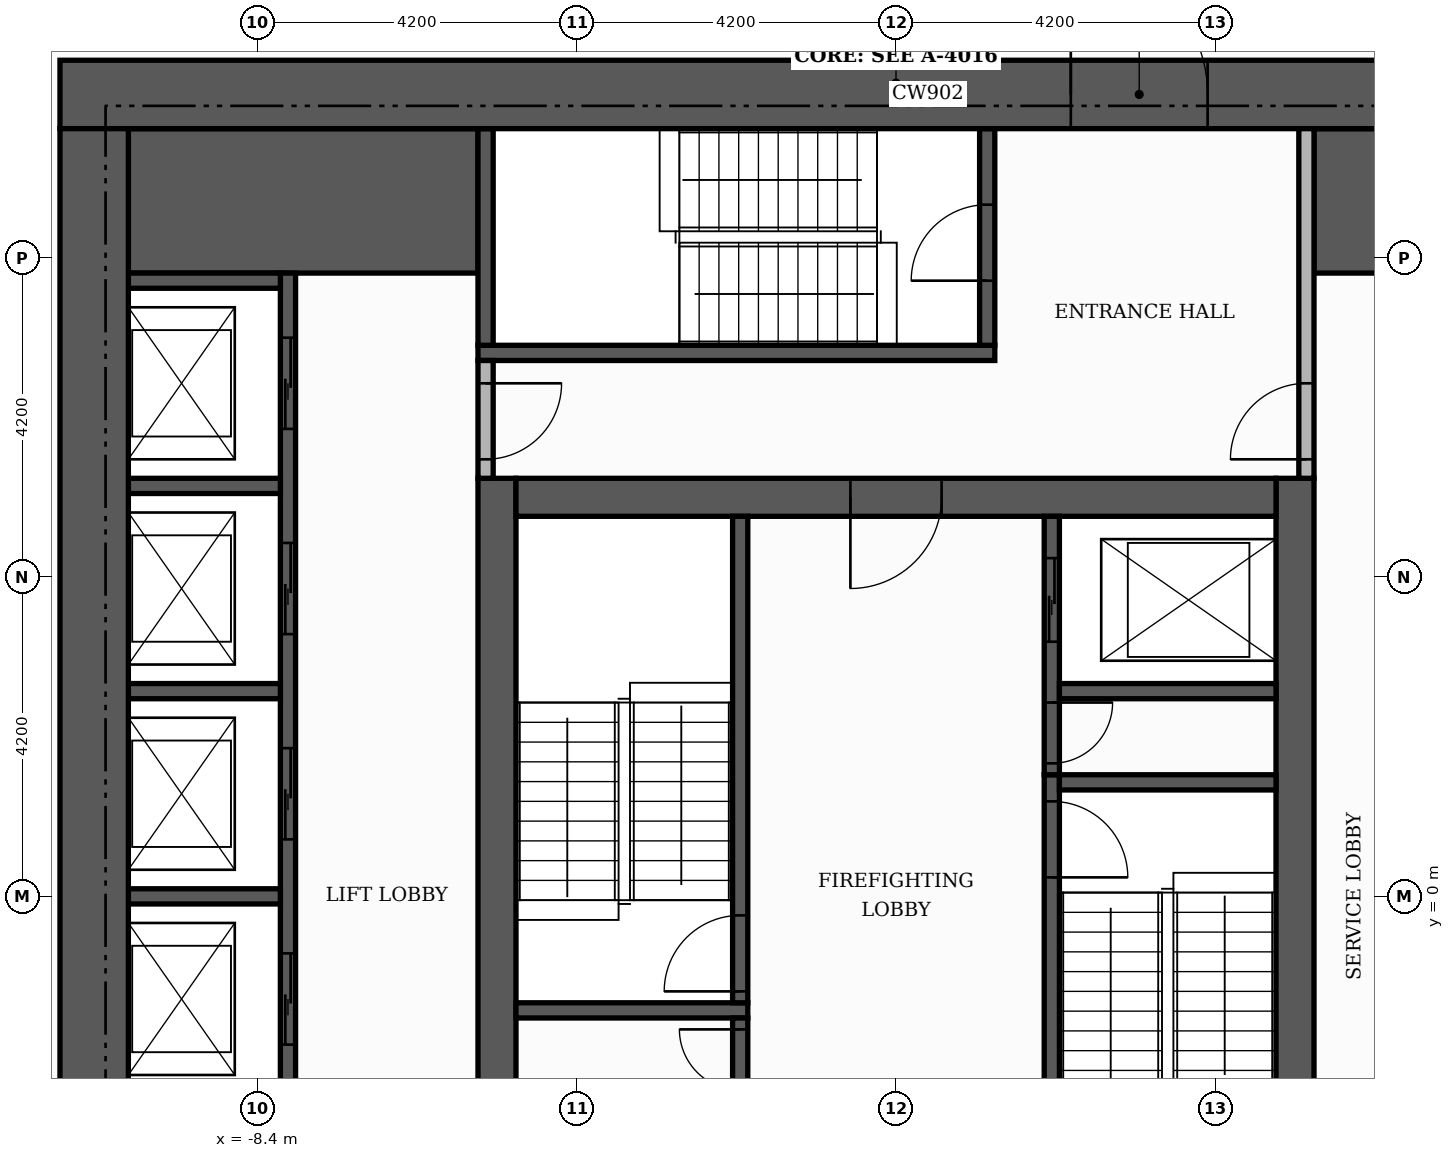
"""IFC4 building model, lengths in metres.
Left out: names, types, materials, properties, quantities, classifications, styles, units other than length and angle.
Written with IfcOpenShell. Run it as: python <this file> out.ifc"""

import sys

from ifc_helpers import new_model, si_unit, direction, frame, frame_2d, origin, place, context, subcontext, project, spatial, rectangle, extrude, element, fill, save


model = new_model("IFC4")
c1 = context("Model", 3, precision=1e-05, world=origin(), true_north=direction((0.0, 1.0)))
c2 = subcontext(c1, "Body", "Model", "MODEL_VIEW")
j1 = project(units=[si_unit("LENGTHUNIT", "METRE"), si_unit("PLANEANGLEUNIT", "RADIAN")], contexts=[c1])
p1 = place(None, origin())
s1 = spatial("IfcSite", under=j1, at=p1, CompositionType="ELEMENT")
p2 = place(p1, origin())
s2 = spatial("IfcBuilding", under=s1, at=p2, CompositionType="ELEMENT")
p3 = place(p2, frame((0.0, 0.0, 106.5)))
s3 = spatial("IfcBuildingStorey", under=s2, at=p3, CompositionType="ELEMENT", Elevation=106.5)
for number, where, z_axis, x_axis in (
    (1, (-5.25, -5.0, 0.0), (0.0, 0.0, 1.0), (0.0, 1.0, 0.0)),
    (2, (5.25, -5.0, 0.0), (0.0, 0.0, 1.0), (0.0, 1.0, 0.0)),
):
    element("IfcWall", number, at=place(p3, frame(where, z_axis=z_axis, x_axis=x_axis)), inside=s3, PredefinedType="SHEAR", context=c2, shape_type="SweptSolid", body=[
        extrude(rectangle(XDim=10.5, YDim=0.5, at=frame_2d((5.25, 0.0))), origin(), (0.0, 0.0, 1.0), 3.48),
    ])
p4 = place(p3, frame((-5.0, 5.25, 0.0), z_axis=(0.0, 0.0, 1.0), x_axis=(1.0, 0.0, 0.0)))
e3 = element("IfcWall", 3, at=p4, inside=s3, PredefinedType="SHEAR", context=c2, shape_type="SweptSolid", body=[
    extrude(rectangle(XDim=10.0, YDim=0.5, at=frame_2d((5.0, 0.0))), origin(), (0.0, 0.0, 1.0), 3.48),
])
p5 = place(p4, frame((4.4, 0.0, 0.0)))
e4 = element("IfcOpeningElement", 4, at=p5, cuts=e3, PredefinedType="OPENING", context=c2, shape_type="SweptSolid", body=[
    extrude(rectangle(XDim=1.2, YDim=2.1, at=frame_2d((0.6, 1.05))), frame((0.0, 0.26, 0.0), z_axis=(0.0, -1.0, 0.0), x_axis=(1.0, 0.0, 0.0)), (0.0, 0.0, 1.0), 0.52),
])
for number, where, z_axis, x_axis in (
    (5, (-10.1, 9.15, 0.0), (0.0, 0.0, 1.0), (1.0, 0.0, 0.0)),
    (6, (5.5, 9.15, 0.0), (0.0, 0.0, 1.0), (1.0, 0.0, 0.0)),
):
    element("IfcWall", number, at=place(p3, frame(where, z_axis=z_axis, x_axis=x_axis)), inside=s3, PredefinedType="SHEAR", context=c2, shape_type="SweptSolid", body=[
        extrude(rectangle(XDim=4.6, YDim=1.9, at=frame_2d((2.3, 0.0))), origin(), (0.0, 0.0, 1.0), 3.48),
    ])
p6 = place(p3, frame((2.05, -5.0, 0.0), z_axis=(0.0, 0.0, 1.0), x_axis=(0.0, 1.0, 0.0)))
e7 = element("IfcWall", 7, at=p6, inside=s3, PredefinedType="SHEAR", context=c2, shape_type="SweptSolid", body=[
    extrude(rectangle(XDim=6.6, YDim=0.2, at=frame_2d((3.3, 0.0))), origin(), (0.0, 0.0, 1.0), 3.48),
])
p7 = place(p6, frame((5.25, 0.0, 0.0)))
e8 = element("IfcOpeningElement", 8, at=p7, cuts=e7, PredefinedType="OPENING", context=c2, shape_type="SweptSolid", body=[
    extrude(rectangle(XDim=1.0, YDim=2.1, at=frame_2d((0.5, 1.05))), frame((0.0, 0.11, 0.0), z_axis=(0.0, -1.0, 0.0), x_axis=(1.0, 0.0, 0.0)), (0.0, 0.0, 1.0), 0.22),
])
p8 = place(p3, frame((-5.0, -1.5, 0.0), z_axis=(0.0, 0.0, 1.0), x_axis=(1.0, 0.0, 0.0)))
e9 = element("IfcWall", 9, at=p8, inside=s3, PredefinedType="SHEAR", context=c2, shape_type="SweptSolid", body=[
    extrude(rectangle(XDim=3.05, YDim=0.2, at=frame_2d((1.525, 0.0))), origin(), (0.0, 0.0, 1.0), 3.48),
])
p9 = place(p3, frame((-2.05, -1.4, 0.0), z_axis=(0.0, 0.0, 1.0), x_axis=(0.0, 1.0, 0.0)))
e10 = element("IfcWall", 10, at=p9, inside=s3, PredefinedType="SHEAR", context=c2, shape_type="SweptSolid", body=[
    extrude(rectangle(XDim=6.4, YDim=0.2, at=frame_2d((3.2, 0.0))), origin(), (0.0, 0.0, 1.0), 3.48),
])
p10 = place(p9, frame((0.15, 0.0, 0.0)))
e11 = element("IfcOpeningElement", 11, at=p10, cuts=e10, PredefinedType="OPENING", context=c2, shape_type="SweptSolid", body=[
    extrude(rectangle(XDim=1.0, YDim=2.1, at=frame_2d((0.5, 1.05))), frame((0.0, 0.11, 0.0), z_axis=(0.0, -1.0, 0.0), x_axis=(1.0, 0.0, 0.0)), (0.0, 0.0, 1.0), 0.22),
])
p11 = place(p3, frame((2.15, 1.5, 0.0), z_axis=(0.0, 0.0, 1.0), x_axis=(1.0, 0.0, 0.0)))
e12 = element("IfcWall", 12, at=p11, inside=s3, PredefinedType="SHEAR", context=c2, shape_type="SweptSolid", body=[
    extrude(rectangle(XDim=2.85, YDim=0.2, at=frame_2d((1.425, 0.0))), origin(), (0.0, 0.0, 1.0), 3.48),
])
p12 = place(p3, frame((-5.5, 7.15, 0.0), z_axis=(0.0, 0.0, 1.0), x_axis=(1.0, 0.0, 0.0)))
e13 = element("IfcWall", 13, at=p12, inside=s3, PredefinedType="SHEAR", context=c2, shape_type="SweptSolid", body=[
    extrude(rectangle(XDim=6.8, YDim=0.2, at=frame_2d((3.4, 0.0))), origin(), (0.0, 0.0, 1.0), 3.48),
])
p13 = place(p3, frame((-5.4, 7.25, 0.0), z_axis=(0.0, 0.0, 1.0), x_axis=(0.0, 1.0, 0.0)))
e14 = element("IfcWall", 14, at=p13, inside=s3, PredefinedType="SHEAR", context=c2, shape_type="SweptSolid", body=[
    extrude(rectangle(XDim=2.85, YDim=0.2, at=frame_2d((1.425, 0.0))), origin(), (0.0, 0.0, 1.0), 3.48),
])
p14 = place(p3, frame((1.2, 7.25, 0.0), z_axis=(0.0, 0.0, 1.0), x_axis=(0.0, 1.0, 0.0)))
e15 = element("IfcWall", 15, at=p14, inside=s3, PredefinedType="SHEAR", context=c2, shape_type="SweptSolid", body=[
    extrude(rectangle(XDim=2.85, YDim=0.2, at=frame_2d((1.425, 0.0))), origin(), (0.0, 0.0, 1.0), 3.48),
])
p15 = place(p14, frame((0.85, 0.0, 0.0)))
e16 = element("IfcOpeningElement", 16, at=p15, cuts=e15, PredefinedType="OPENING", context=c2, shape_type="SweptSolid", body=[
    extrude(rectangle(XDim=1.0, YDim=2.1, at=frame_2d((0.5, 1.05))), frame((0.0, 0.11, 0.0), z_axis=(0.0, -1.0, 0.0), x_axis=(1.0, 0.0, 0.0)), (0.0, 0.0, 1.0), 0.22),
])
p16 = place(p3, frame((-8.0, -8.0, 0.0), z_axis=(0.0, 0.0, 1.0), x_axis=(0.0, 1.0, 0.0)))
e17 = element("IfcWall", 17, at=p16, inside=s3, PredefinedType="SHEAR", context=c2, shape_type="SweptSolid", body=[
    extrude(rectangle(XDim=16.2, YDim=0.2, at=frame_2d((8.1, 0.0))), origin(), (0.0, 0.0, 1.0), 3.48),
])
p17 = place(p16, frame((0.65, 0.0, 0.0)))
e18 = element("IfcOpeningElement", 18, at=p17, cuts=e17, PredefinedType="OPENING", context=c2, shape_type="SweptSolid", body=[
    extrude(rectangle(XDim=1.2, YDim=2.1, at=frame_2d((0.6, 1.05))), frame((0.0, 0.11, 0.0), z_axis=(0.0, -1.0, 0.0), x_axis=(1.0, 0.0, 0.0)), (0.0, 0.0, 1.0), 0.22),
])
p18 = place(p16, frame((3.35, 0.0, 0.0)))
e19 = element("IfcOpeningElement", 19, at=p18, cuts=e17, PredefinedType="OPENING", context=c2, shape_type="SweptSolid", body=[
    extrude(rectangle(XDim=1.2, YDim=2.1, at=frame_2d((0.6, 1.05))), frame((0.0, 0.11, 0.0), z_axis=(0.0, -1.0, 0.0), x_axis=(1.0, 0.0, 0.0)), (0.0, 0.0, 1.0), 0.22),
])
p19 = place(p16, frame((6.05, 0.0, 0.0)))
e20 = element("IfcOpeningElement", 20, at=p19, cuts=e17, PredefinedType="OPENING", context=c2, shape_type="SweptSolid", body=[
    extrude(rectangle(XDim=1.2, YDim=2.1, at=frame_2d((0.6, 1.05))), frame((0.0, 0.11, 0.0), z_axis=(0.0, -1.0, 0.0), x_axis=(1.0, 0.0, 0.0)), (0.0, 0.0, 1.0), 0.22),
])
p20 = place(p16, frame((8.75, 0.0, 0.0)))
e21 = element("IfcOpeningElement", 21, at=p20, cuts=e17, PredefinedType="OPENING", context=c2, shape_type="SweptSolid", body=[
    extrude(rectangle(XDim=1.2, YDim=2.1, at=frame_2d((0.6, 1.05))), frame((0.0, 0.11, 0.0), z_axis=(0.0, -1.0, 0.0), x_axis=(1.0, 0.0, 0.0)), (0.0, 0.0, 1.0), 0.22),
])
p21 = place(p16, frame((11.45, 0.0, 0.0)))
e22 = element("IfcOpeningElement", 22, at=p21, cuts=e17, PredefinedType="OPENING", context=c2, shape_type="SweptSolid", body=[
    extrude(rectangle(XDim=1.2, YDim=2.1, at=frame_2d((0.6, 1.05))), frame((0.0, 0.11, 0.0), z_axis=(0.0, -1.0, 0.0), x_axis=(1.0, 0.0, 0.0)), (0.0, 0.0, 1.0), 0.22),
])
p22 = place(p16, frame((14.15, 0.0, 0.0)))
e23 = element("IfcOpeningElement", 23, at=p22, cuts=e17, PredefinedType="OPENING", context=c2, shape_type="SweptSolid", body=[
    extrude(rectangle(XDim=1.2, YDim=2.1, at=frame_2d((0.6, 1.05))), frame((0.0, 0.11, 0.0), z_axis=(0.0, -1.0, 0.0), x_axis=(1.0, 0.0, 0.0)), (0.0, 0.0, 1.0), 0.22),
])
p23 = place(p3, frame((-2.05, -5.0, 0.0), z_axis=(0.0, 0.0, 1.0), x_axis=(0.0, 1.0, 0.0)))
e24 = element("IfcWall", 24, at=p23, inside=s3, PredefinedType="SHEAR", context=c2, shape_type="SweptSolid", body=[
    extrude(rectangle(XDim=3.4, YDim=0.2, at=frame_2d((1.7, 0.0))), origin(), (0.0, 0.0, 1.0), 3.48),
])
p24 = place(p23, frame((0.55, 0.0, 0.0)))
e25 = element("IfcOpeningElement", 25, at=p24, cuts=e24, PredefinedType="OPENING", context=c2, shape_type="SweptSolid", body=[
    extrude(rectangle(XDim=1.1, YDim=2.1, at=frame_2d((0.55, 1.05))), frame((0.0, 0.11, 0.0), z_axis=(0.0, -1.0, 0.0), x_axis=(1.0, 0.0, 0.0)), (0.0, 0.0, 1.0), 0.22),
])
p25 = place(p23, frame((2.45, 0.0, 0.0)))
e26 = element("IfcOpeningElement", 26, at=p25, cuts=e24, PredefinedType="OPENING", context=c2, shape_type="SweptSolid", body=[
    extrude(rectangle(XDim=0.8, YDim=2.1, at=frame_2d((0.4, 1.05))), frame((0.0, 0.11, 0.0), z_axis=(0.0, -1.0, 0.0), x_axis=(1.0, 0.0, 0.0)), (0.0, 0.0, 1.0), 0.22),
])
p26 = place(p3, frame((-10.1, 0.0, 0.0), z_axis=(0.0, 0.0, 1.0), x_axis=(1.0, 0.0, 0.0)))
e27 = element("IfcWall", 27, at=p26, inside=s3, PredefinedType="SHEAR", context=c2, shape_type="SweptSolid", body=[
    extrude(rectangle(XDim=2.0, YDim=0.2, at=frame_2d((1.0, 0.0))), origin(), (0.0, 0.0, 1.0), 3.48),
])
p27 = place(p3, frame((2.05, 1.6, 0.0), z_axis=(0.0, 0.0, 1.0), x_axis=(0.0, 1.0, 0.0)))
e28 = element("IfcWall", 28, at=p27, inside=s3, PredefinedType="SHEAR", context=c2, shape_type="SweptSolid", body=[
    extrude(rectangle(XDim=3.4, YDim=0.2, at=frame_2d((1.7, 0.0))), origin(), (0.0, 0.0, 1.0), 3.48),
])
p28 = place(p27, frame((1.75, 0.0, 0.0)))
e29 = element("IfcOpeningElement", 29, at=p28, cuts=e28, PredefinedType="OPENING", context=c2, shape_type="SweptSolid", body=[
    extrude(rectangle(XDim=1.1, YDim=2.1, at=frame_2d((0.55, 1.05))), frame((0.0, 0.11, 0.0), z_axis=(0.0, -1.0, 0.0), x_axis=(1.0, 0.0, 0.0)), (0.0, 0.0, 1.0), 0.22),
])
p29 = place(p27, frame((0.15, 0.0, 0.0)))
e30 = element("IfcOpeningElement", 30, at=p29, cuts=e28, PredefinedType="OPENING", context=c2, shape_type="SweptSolid", body=[
    extrude(rectangle(XDim=0.8, YDim=2.1, at=frame_2d((0.4, 1.05))), frame((0.0, 0.11, 0.0), z_axis=(0.0, -1.0, 0.0), x_axis=(1.0, 0.0, 0.0)), (0.0, 0.0, 1.0), 0.22),
])
p30 = place(p3, frame((-10.1, 2.7, 0.0), z_axis=(0.0, 0.0, 1.0), x_axis=(1.0, 0.0, 0.0)))
e31 = element("IfcWall", 31, at=p30, inside=s3, PredefinedType="SHEAR", context=c2, shape_type="SweptSolid", body=[
    extrude(rectangle(XDim=2.0, YDim=0.2, at=frame_2d((1.0, 0.0))), origin(), (0.0, 0.0, 1.0), 3.48),
])
p31 = place(p3, frame((2.15, 2.7, 0.0), z_axis=(0.0, 0.0, 1.0), x_axis=(1.0, 0.0, 0.0)))
e32 = element("IfcWall", 32, at=p31, inside=s3, PredefinedType="SHEAR", context=c2, shape_type="SweptSolid", body=[
    extrude(rectangle(XDim=2.85, YDim=0.2, at=frame_2d((1.425, 0.0))), origin(), (0.0, 0.0, 1.0), 3.48),
])
for number, where, z_axis, x_axis in (
    (33, (-10.1, 5.4, 0.0), (0.0, 0.0, 1.0), (1.0, 0.0, 0.0)),
    (34, (-10.1, 8.1, 0.0), (0.0, 0.0, 1.0), (1.0, 0.0, 0.0)),
):
    element("IfcWall", number, at=place(p3, frame(where, z_axis=z_axis, x_axis=x_axis)), inside=s3, PredefinedType="SHEAR", context=c2, shape_type="SweptSolid", body=[
        extrude(rectangle(XDim=2.0, YDim=0.2, at=frame_2d((1.0, 0.0))), origin(), (0.0, 0.0, 1.0), 3.48),
    ])
p32 = place(p3, frame((-11.0, 10.55, 0.0), z_axis=(0.0, 0.0, 1.0), x_axis=(1.0, 0.0, 0.0)))
e35 = element("IfcWall", 35, at=p32, inside=s3, PredefinedType="SHEAR", context=c2, shape_type="SweptSolid", body=[
    extrude(rectangle(XDim=22.0, YDim=0.9, at=frame_2d((11.0, 0.0))), origin(), (0.0, 0.0, 1.0), 3.48),
])
p33 = place(p32, frame((13.3, 0.0, 0.0)))
e36 = element("IfcOpeningElement", 36, at=p33, cuts=e35, PredefinedType="OPENING", context=c2, shape_type="SweptSolid", body=[
    extrude(rectangle(XDim=1.8, YDim=2.2, at=frame_2d((0.9, 1.1))), frame((0.0, 0.46, 0.0), z_axis=(0.0, -1.0, 0.0), x_axis=(1.0, 0.0, 0.0)), (0.0, 0.0, 1.0), 0.92),
])
p34 = place(p3, frame((-10.55, -10.1, 0.0), z_axis=(0.0, 0.0, 1.0), x_axis=(0.0, 1.0, 0.0)))
e37 = element("IfcWall", 37, at=p34, inside=s3, PredefinedType="SHEAR", context=c2, shape_type="SweptSolid", body=[
    extrude(rectangle(XDim=20.2, YDim=0.9, at=frame_2d((10.1, 0.0))), origin(), (0.0, 0.0, 1.0), 3.48),
])
p35 = place(p3, frame((-5.4, 5.5, 0.0), z_axis=(0.0, 0.0, 1.0), x_axis=(0.0, 1.0, 0.0)))
e38 = element("IfcWall", 38, at=p35, inside=s3, PredefinedType="PARTITIONING", context=c2, shape_type="SweptSolid", body=[
    extrude(rectangle(XDim=1.55, YDim=0.2, at=frame_2d((0.775, 0.0))), origin(), (0.0, 0.0, 1.0), 3.48),
])
p36 = place(p35, frame((0.25, 0.0, 0.0)))
e39 = element("IfcOpeningElement", 39, at=p36, cuts=e38, PredefinedType="OPENING", context=c2, shape_type="SweptSolid", body=[
    extrude(rectangle(XDim=1.0, YDim=2.1, at=frame_2d((0.5, 1.05))), frame((0.0, 0.11, 0.0), z_axis=(0.0, -1.0, 0.0), x_axis=(1.0, 0.0, 0.0)), (0.0, 0.0, 1.0), 0.22),
])
p37 = place(p3, frame((5.4, 5.5, 0.0), z_axis=(0.0, 0.0, 1.0), x_axis=(0.0, 1.0, 0.0)))
e40 = element("IfcWall", 40, at=p37, inside=s3, PredefinedType="PARTITIONING", context=c2, shape_type="SweptSolid", body=[
    extrude(rectangle(XDim=4.6, YDim=0.2, at=frame_2d((2.3, 0.0))), origin(), (0.0, 0.0, 1.0), 3.48),
])
p38 = place(p37, frame((0.25, 0.0, 0.0)))
e41 = element("IfcOpeningElement", 41, at=p38, cuts=e40, PredefinedType="OPENING", context=c2, shape_type="SweptSolid", body=[
    extrude(rectangle(XDim=1.0, YDim=2.1, at=frame_2d((0.5, 1.05))), frame((0.0, 0.11, 0.0), z_axis=(0.0, -1.0, 0.0), x_axis=(1.0, 0.0, 0.0)), (0.0, 0.0, 1.0), 0.22),
])
p39 = place(p19, origin())
e42 = element("IfcDoor", 42, at=p39, inside=s3, OperationType="SLIDING_TO_LEFT", PredefinedType="DOOR", context=c2, shape_type="SweptSolid", body=[
    extrude(rectangle(XDim=1.2, YDim=2.1, at=frame_2d((0.6, 1.05))), frame((0.0, 0.025, 0.0), z_axis=(0.0, -1.0, 0.0), x_axis=(1.0, 0.0, 0.0)), (0.0, 0.0, 1.0), 0.05),
])
fill(e20, e42)
p40 = place(p20, origin())
e43 = element("IfcDoor", 43, at=p40, inside=s3, OperationType="SLIDING_TO_LEFT", PredefinedType="DOOR", context=c2, shape_type="SweptSolid", body=[
    extrude(rectangle(XDim=1.2, YDim=2.1, at=frame_2d((0.6, 1.05))), frame((0.0, 0.025, 0.0), z_axis=(0.0, -1.0, 0.0), x_axis=(1.0, 0.0, 0.0)), (0.0, 0.0, 1.0), 0.05),
])
fill(e21, e43)
p41 = place(p21, origin())
e44 = element("IfcDoor", 44, at=p41, inside=s3, OperationType="SLIDING_TO_LEFT", PredefinedType="DOOR", context=c2, shape_type="SweptSolid", body=[
    extrude(rectangle(XDim=1.2, YDim=2.1, at=frame_2d((0.6, 1.05))), frame((0.0, 0.025, 0.0), z_axis=(0.0, -1.0, 0.0), x_axis=(1.0, 0.0, 0.0)), (0.0, 0.0, 1.0), 0.05),
])
fill(e22, e44)
p42 = place(p22, origin())
e45 = element("IfcDoor", 45, at=p42, inside=s3, OperationType="SLIDING_TO_LEFT", PredefinedType="DOOR", context=c2, shape_type="SweptSolid", body=[
    extrude(rectangle(XDim=1.2, YDim=2.1, at=frame_2d((0.6, 1.05))), frame((0.0, 0.025, 0.0), z_axis=(0.0, -1.0, 0.0), x_axis=(1.0, 0.0, 0.0)), (0.0, 0.0, 1.0), 0.05),
])
fill(e23, e45)
p43 = place(p28, origin())
e46 = element("IfcDoor", 46, at=p43, inside=s3, OperationType="SLIDING_TO_LEFT", PredefinedType="DOOR", context=c2, shape_type="SweptSolid", body=[
    extrude(rectangle(XDim=1.1, YDim=2.1, at=frame_2d((0.55, 1.05))), frame((0.0, 0.025, 0.0), z_axis=(0.0, -1.0, 0.0), x_axis=(1.0, 0.0, 0.0)), (0.0, 0.0, 1.0), 0.05),
])
fill(e29, e46)
p44 = place(p10, origin())
e47 = element("IfcDoor", 47, at=p44, inside=s3, OperationType="SINGLE_SWING_LEFT", PredefinedType="DOOR", context=c2, shape_type="SweptSolid", body=[
    extrude(rectangle(XDim=1.0, YDim=2.1, at=frame_2d((0.5, 1.05))), frame((0.0, 0.025, 0.0), z_axis=(0.0, -1.0, 0.0), x_axis=(1.0, 0.0, 0.0)), (0.0, 0.0, 1.0), 0.05),
])
fill(e11, e47)
p45 = place(p7, frame((1.0, 0.0, 0.0), z_axis=(0.0, 0.0, 1.0), x_axis=(-1.0, 0.0, 0.0)))
e48 = element("IfcDoor", 48, at=p45, inside=s3, OperationType="SINGLE_SWING_LEFT", PredefinedType="DOOR", context=c2, shape_type="SweptSolid", body=[
    extrude(rectangle(XDim=1.0, YDim=2.1, at=frame_2d((0.5, 1.05))), frame((0.0, 0.025, 0.0), z_axis=(0.0, -1.0, 0.0), x_axis=(1.0, 0.0, 0.0)), (0.0, 0.0, 1.0), 0.05),
])
fill(e8, e48)
p46 = place(p29, frame((0.8, 0.0, 0.0), z_axis=(0.0, 0.0, 1.0), x_axis=(-1.0, 0.0, 0.0)))
e49 = element("IfcDoor", 49, at=p46, inside=s3, OperationType="SINGLE_SWING_RIGHT", PredefinedType="DOOR", context=c2, shape_type="SweptSolid", body=[
    extrude(rectangle(XDim=0.8, YDim=2.1, at=frame_2d((0.4, 1.05))), frame((0.0, 0.025, 0.0), z_axis=(0.0, -1.0, 0.0), x_axis=(1.0, 0.0, 0.0)), (0.0, 0.0, 1.0), 0.05),
])
fill(e30, e49)
p47 = place(p25, origin())
e50 = element("IfcDoor", 50, at=p47, inside=s3, OperationType="SINGLE_SWING_RIGHT", PredefinedType="DOOR", context=c2, shape_type="SweptSolid", body=[
    extrude(rectangle(XDim=0.8, YDim=2.1, at=frame_2d((0.4, 1.05))), frame((0.0, 0.025, 0.0), z_axis=(0.0, -1.0, 0.0), x_axis=(1.0, 0.0, 0.0)), (0.0, 0.0, 1.0), 0.05),
])
fill(e26, e50)
p48 = place(p5, frame((1.2, 0.0, 0.0), z_axis=(0.0, 0.0, 1.0), x_axis=(-1.0, 0.0, 0.0)))
e51 = element("IfcDoor", 51, at=p48, inside=s3, OperationType="SINGLE_SWING_LEFT", PredefinedType="DOOR", context=c2, shape_type="SweptSolid", body=[
    extrude(rectangle(XDim=1.2, YDim=2.1, at=frame_2d((0.6, 1.05))), frame((0.0, 0.025, 0.0), z_axis=(0.0, -1.0, 0.0), x_axis=(1.0, 0.0, 0.0)), (0.0, 0.0, 1.0), 0.05),
])
fill(e4, e51)
p49 = place(p15, origin())
e52 = element("IfcDoor", 52, at=p49, inside=s3, OperationType="SINGLE_SWING_LEFT", PredefinedType="DOOR", context=c2, shape_type="SweptSolid", body=[
    extrude(rectangle(XDim=1.0, YDim=2.1, at=frame_2d((0.5, 1.05))), frame((0.0, 0.025, 0.0), z_axis=(0.0, -1.0, 0.0), x_axis=(1.0, 0.0, 0.0)), (0.0, 0.0, 1.0), 0.05),
])
fill(e16, e52)
p50 = place(p36, frame((1.0, 0.0, 0.0), z_axis=(0.0, 0.0, 1.0), x_axis=(-1.0, 0.0, 0.0)))
e53 = element("IfcDoor", 53, at=p50, inside=s3, OperationType="SINGLE_SWING_RIGHT", PredefinedType="DOOR", context=c2, shape_type="SweptSolid", body=[
    extrude(rectangle(XDim=1.0, YDim=2.1, at=frame_2d((0.5, 1.05))), frame((0.0, 0.025, 0.0), z_axis=(0.0, -1.0, 0.0), x_axis=(1.0, 0.0, 0.0)), (0.0, 0.0, 1.0), 0.05),
])
fill(e39, e53)
p51 = place(p38, origin())
e54 = element("IfcDoor", 54, at=p51, inside=s3, OperationType="SINGLE_SWING_LEFT", PredefinedType="DOOR", context=c2, shape_type="SweptSolid", body=[
    extrude(rectangle(XDim=1.0, YDim=2.1, at=frame_2d((0.5, 1.05))), frame((0.0, 0.025, 0.0), z_axis=(0.0, -1.0, 0.0), x_axis=(1.0, 0.0, 0.0)), (0.0, 0.0, 1.0), 0.05),
])
fill(e41, e54)
p52 = place(p33, origin())
e55 = element("IfcDoor", 55, at=p52, inside=s3, OperationType="DOUBLE_DOOR_SINGLE_SWING", PredefinedType="DOOR", context=c2, shape_type="SweptSolid", body=[
    extrude(rectangle(XDim=1.8, YDim=2.2, at=frame_2d((0.9, 1.1))), frame((0.0, 0.025, 0.0), z_axis=(0.0, -1.0, 0.0), x_axis=(1.0, 0.0, 0.0)), (0.0, 0.0, 1.0), 0.05),
])
fill(e36, e55)
save(model, sys.argv[1])
